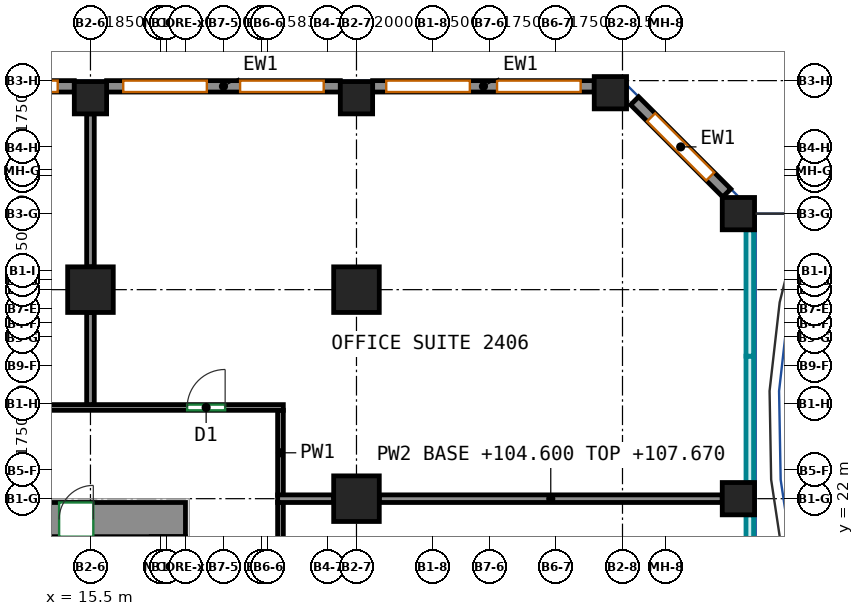
"""IFC4 building model, lengths in metres.
Left out: names, types, materials, properties, quantities, classifications, styles, units other than length and angle.
Written with IfcOpenShell. Run it as: python <this file> out.ifc"""

import sys

from ifc_helpers import new_model, si_unit, direction, frame, frame_2d, origin, origin_2d, place, context, subcontext, project, spatial, rectangle, extrude, source, transform, mapped, element, fill, save


model = new_model("IFC4")
c1 = context("Model", 3, precision=1e-05, world=origin(), true_north=direction((0.0, 1.0)))
c2 = subcontext(c1, "Body", "Model", "MODEL_VIEW")
j1 = project(units=[si_unit("LENGTHUNIT", "METRE"), si_unit("PLANEANGLEUNIT", "RADIAN")], contexts=[c1])
p1 = place(None, origin())
s1 = spatial("IfcSite", under=j1, at=p1, CompositionType="ELEMENT")
p2 = place(p1, origin())
s2 = spatial("IfcBuilding", under=s1, at=p2, CompositionType="ELEMENT")
p3 = place(p2, frame((0.0, 0.0, 104.6)))
s3 = spatial("IfcBuildingStorey", under=s2, at=p3, CompositionType="ELEMENT", Elevation=104.6)
m1 = source(origin(), c2, "Body", "SweptSolid", [
    extrude(rectangle(XDim=1.2, YDim=1.2, at=origin_2d()), origin(), (0.0, 0.0, 1.0), 3.72),
])
p4 = place(p3, frame((15.5, 27.5, 0.0), z_axis=(0.0, 0.0, 1.0), x_axis=(1.0, 0.0, 0.0)))
e1 = element("IfcColumn", 1, at=p4, inside=s3, PredefinedType="COLUMN", context=c2, shape_type="MappedRepresentation", body=[
    mapped(m1, transform((0.0, 0.0, 0.0))),
])
m2 = source(origin(), c2, "Body", "SweptSolid", [
    extrude(rectangle(XDim=0.85, YDim=0.85, at=origin_2d()), origin(), (0.0, 0.0, 1.0), 3.72),
])
p5 = place(p3, frame((15.5, 32.55, 0.0), z_axis=(0.0, 0.0, 1.0), x_axis=(1.0, 0.0, 0.0)))
e2 = element("IfcColumn", 2, at=p5, inside=s3, PredefinedType="COLUMN", context=c2, shape_type="MappedRepresentation", body=[
    mapped(m2, transform((0.0, 0.0, 0.0))),
])
for number, where, z_axis, x_axis in (
    (3, (22.5, 22.0, 0.0), (0.0, 0.0, 1.0), (1.0, 0.0, 0.0)),
    (4, (22.5, 27.5, 0.0), (0.0, 0.0, 1.0), (1.0, 0.0, 0.0)),
):
    element("IfcColumn", number, at=place(p3, frame(where, z_axis=z_axis, x_axis=x_axis)), inside=s3, PredefinedType="COLUMN", context=c2, shape_type="MappedRepresentation", body=[
        mapped(m1, transform((0.0, 0.0, 0.0))),
    ])
for number, where, z_axis, x_axis in (
    (5, (22.5, 32.55, 0.0), (0.0, 0.0, 1.0), (1.0, 0.0, 0.0)),
    (6, (29.182, 32.682, 0.0), (0.0, 0.0, 1.0), (1.0, 0.0, 0.0)),
    (7, (32.55, 22.0, 0.0), (0.0, 0.0, 1.0), (1.0, 0.0, 0.0)),
    (8, (32.55, 29.5, 0.0), (0.0, 0.0, 1.0), (1.0, 0.0, 0.0)),
):
    element("IfcColumn", number, at=place(p3, frame(where, z_axis=z_axis, x_axis=x_axis)), inside=s3, PredefinedType="COLUMN", context=c2, shape_type="MappedRepresentation", body=[
        mapped(m2, transform((0.0, 0.0, 0.0))),
    ])
m3 = source(origin(), c2, "Body", "SweptSolid", [
    extrude(rectangle(XDim=33.9, YDim=0.9, at=frame_2d((16.95, 0.0))), origin(), (0.0, 0.0, 1.0), 3.72),
])
p6 = place(p3, frame((-15.9, 21.45, 0.0), z_axis=(0.0, 0.0, 1.0), x_axis=(1.0, 0.0, 0.0)))
e9 = element("IfcWall", 9, at=p6, inside=s3, PredefinedType="SHEAR", context=c2, shape_type="MappedRepresentation", body=[
    mapped(m3, transform((0.0, 0.0, 0.0))),
])
p7 = place(p6, frame((7.12, 0.0, 0.0)))
e10 = element("IfcOpeningElement", 10, at=p7, cuts=e9, PredefinedType="OPENING", context=c2, shape_type="SweptSolid", body=[
    extrude(rectangle(XDim=0.9, YDim=2.1, at=frame_2d((0.45, 1.05))), frame((0.0, 0.46, 0.0), z_axis=(0.0, -1.0, 0.0), x_axis=(1.0, 0.0, 0.0)), (0.0, 0.0, 1.0), 0.92),
])
p8 = place(p6, frame((11.1, 0.0, 0.0)))
e11 = element("IfcOpeningElement", 11, at=p8, cuts=e9, PredefinedType="OPENING", context=c2, shape_type="SweptSolid", body=[
    extrude(rectangle(XDim=0.9, YDim=2.1, at=frame_2d((0.45, 1.05))), frame((0.0, 0.46, 0.0), z_axis=(0.0, -1.0, 0.0), x_axis=(1.0, 0.0, 0.0)), (0.0, 0.0, 1.0), 0.92),
])
p9 = place(p6, frame((14.45, 0.0, 0.0)))
e12 = element("IfcOpeningElement", 12, at=p9, cuts=e9, PredefinedType="OPENING", context=c2, shape_type="SweptSolid", body=[
    extrude(rectangle(XDim=0.9, YDim=2.1, at=frame_2d((0.45, 1.05))), frame((0.0, 0.46, 0.0), z_axis=(0.0, -1.0, 0.0), x_axis=(1.0, 0.0, 0.0)), (0.0, 0.0, 1.0), 0.92),
])
p10 = place(p6, frame((19.274, 0.0, 0.0)))
e13 = element("IfcOpeningElement", 13, at=p10, cuts=e9, PredefinedType="OPENING", context=c2, shape_type="SweptSolid", body=[
    extrude(rectangle(XDim=0.9, YDim=2.1, at=frame_2d((0.45, 1.05))), frame((0.0, 0.46, 0.0), z_axis=(0.0, -1.0, 0.0), x_axis=(1.0, 0.0, 0.0)), (0.0, 0.0, 1.0), 0.92),
])
p11 = place(p6, frame((25.304, 0.0, 0.0)))
e14 = element("IfcOpeningElement", 14, at=p11, cuts=e9, PredefinedType="OPENING", context=c2, shape_type="SweptSolid", body=[
    extrude(rectangle(XDim=0.9, YDim=2.1, at=frame_2d((0.45, 1.05))), frame((0.0, 0.46, 0.0), z_axis=(0.0, -1.0, 0.0), x_axis=(1.0, 0.0, 0.0)), (0.0, 0.0, 1.0), 0.92),
])
p12 = place(p6, frame((2.425, 0.0, 0.0)))
e15 = element("IfcOpeningElement", 15, at=p12, cuts=e9, PredefinedType="OPENING", context=c2, shape_type="SweptSolid", body=[
    extrude(rectangle(XDim=0.9, YDim=2.1, at=frame_2d((0.45, 1.05))), frame((0.0, 0.46, 0.0), z_axis=(0.0, -1.0, 0.0), x_axis=(1.0, 0.0, 0.0)), (0.0, 0.0, 1.0), 0.92),
])
p13 = place(p6, frame((30.575, 0.0, 0.0)))
e16 = element("IfcOpeningElement", 16, at=p13, cuts=e9, PredefinedType="OPENING", context=c2, shape_type="SweptSolid", body=[
    extrude(rectangle(XDim=0.9, YDim=2.1, at=frame_2d((0.45, 1.05))), frame((0.0, 0.46, 0.0), z_axis=(0.0, -1.0, 0.0), x_axis=(1.0, 0.0, 0.0)), (0.0, 0.0, 1.0), 0.92),
])
m4 = source(origin(), c2, "Body", "SweptSolid", [
    extrude(rectangle(XDim=3.429, YDim=0.3, at=frame_2d((1.715, 0.0))), origin(), (0.0, 0.0, 1.0), 3.72),
])
p14 = place(p3, frame((32.244, 30.044, 0.0), z_axis=(0.0, 0.0, 1.0), x_axis=(-0.707106781187, 0.707106781187, 0.0)))
e17 = element("IfcWall", 17, at=p14, inside=s3, PredefinedType="SOLIDWALL", context=c2, shape_type="MappedRepresentation", body=[
    mapped(m4, transform((0.0, 0.0, 0.0))),
])
p15 = place(p14, frame((0.615, 0.0, 0.7)))
e18 = element("IfcOpeningElement", 18, at=p15, cuts=e17, PredefinedType="OPENING", context=c2, shape_type="SweptSolid", body=[
    extrude(rectangle(XDim=2.2, YDim=2.25, at=frame_2d((1.1, 1.125))), frame((0.0, 0.16, 0.0), z_axis=(0.0, -1.0, 0.0), x_axis=(1.0, 0.0, 0.0)), (0.0, 0.0, 1.0), 0.32),
])
m5 = source(origin(), c2, "Body", "SweptSolid", [
    extrude(rectangle(XDim=5.832, YDim=0.3, at=frame_2d((2.916, 0.0))), origin(), (0.0, 0.0, 1.0), 3.72),
])
p16 = place(p3, frame((28.757, 32.85, 0.0), z_axis=(0.0, 0.0, 1.0), x_axis=(-1.0, 0.0, 0.0)))
e19 = element("IfcWall", 19, at=p16, inside=s3, PredefinedType="SOLIDWALL", context=c2, shape_type="MappedRepresentation", body=[
    mapped(m5, transform((0.0, 0.0, 0.0))),
])
p17 = place(p16, frame((0.358, 0.0, 0.7)))
e20 = element("IfcOpeningElement", 20, at=p17, cuts=e19, PredefinedType="OPENING", context=c2, shape_type="SweptSolid", body=[
    extrude(rectangle(XDim=2.2, YDim=2.25, at=frame_2d((1.1, 1.125))), frame((0.0, 0.16, 0.0), z_axis=(0.0, -1.0, 0.0), x_axis=(1.0, 0.0, 0.0)), (0.0, 0.0, 1.0), 0.32),
])
p18 = place(p16, frame((3.274, 0.0, 0.7)))
e21 = element("IfcOpeningElement", 21, at=p18, cuts=e19, PredefinedType="OPENING", context=c2, shape_type="SweptSolid", body=[
    extrude(rectangle(XDim=2.2, YDim=2.25, at=frame_2d((1.1, 1.125))), frame((0.0, 0.16, 0.0), z_axis=(0.0, -1.0, 0.0), x_axis=(1.0, 0.0, 0.0)), (0.0, 0.0, 1.0), 0.32),
])
m6 = source(origin(), c2, "Body", "SweptSolid", [
    extrude(rectangle(XDim=6.15, YDim=0.3, at=frame_2d((3.075, 0.0))), origin(), (0.0, 0.0, 1.0), 3.72),
])
p19 = place(p3, frame((22.075, 32.85, 0.0), z_axis=(0.0, 0.0, 1.0), x_axis=(-1.0, 0.0, 0.0)))
e22 = element("IfcWall", 22, at=p19, inside=s3, PredefinedType="SOLIDWALL", context=c2, shape_type="MappedRepresentation", body=[
    mapped(m6, transform((0.0, 0.0, 0.0))),
])
p20 = place(p19, frame((0.438, 0.0, 0.7)))
e23 = element("IfcOpeningElement", 23, at=p20, cuts=e22, PredefinedType="OPENING", context=c2, shape_type="SweptSolid", body=[
    extrude(rectangle(XDim=2.2, YDim=2.25, at=frame_2d((1.1, 1.125))), frame((0.0, 0.16, 0.0), z_axis=(0.0, -1.0, 0.0), x_axis=(1.0, 0.0, 0.0)), (0.0, 0.0, 1.0), 0.32),
])
p21 = place(p19, frame((3.512, 0.0, 0.7)))
e24 = element("IfcOpeningElement", 24, at=p21, cuts=e22, PredefinedType="OPENING", context=c2, shape_type="SweptSolid", body=[
    extrude(rectangle(XDim=2.2, YDim=2.25, at=frame_2d((1.1, 1.125))), frame((0.0, 0.16, 0.0), z_axis=(0.0, -1.0, 0.0), x_axis=(1.0, 0.0, 0.0)), (0.0, 0.0, 1.0), 0.32),
])
p22 = place(p3, frame((15.075, 32.85, 0.0), z_axis=(0.0, 0.0, 1.0), x_axis=(-1.0, 0.0, 0.0)))
e25 = element("IfcWall", 25, at=p22, inside=s3, PredefinedType="SOLIDWALL", context=c2, shape_type="MappedRepresentation", body=[
    mapped(m6, transform((0.0, 0.0, 0.0))),
])
p23 = place(p22, frame((0.438, 0.0, 0.7)))
e26 = element("IfcOpeningElement", 26, at=p23, cuts=e25, PredefinedType="OPENING", context=c2, shape_type="SweptSolid", body=[
    extrude(rectangle(XDim=2.2, YDim=2.25, at=frame_2d((1.1, 1.125))), frame((0.0, 0.16, 0.0), z_axis=(0.0, -1.0, 0.0), x_axis=(1.0, 0.0, 0.0)), (0.0, 0.0, 1.0), 0.32),
])
p24 = place(p22, frame((3.512, 0.0, 0.7)))
e27 = element("IfcOpeningElement", 27, at=p24, cuts=e25, PredefinedType="OPENING", context=c2, shape_type="SweptSolid", body=[
    extrude(rectangle(XDim=2.2, YDim=2.25, at=frame_2d((1.1, 1.125))), frame((0.0, 0.16, 0.0), z_axis=(0.0, -1.0, 0.0), x_axis=(1.0, 0.0, 0.0)), (0.0, 0.0, 1.0), 0.32),
])
p25 = place(p3, frame((20.5, 17.75, 0.0), z_axis=(0.0, 0.0, 1.0), x_axis=(0.0, 1.0, 0.0)))
e28 = element("IfcWall", 28, at=p25, inside=s3, PredefinedType="PARTITIONING", context=c2, shape_type="SweptSolid", body=[
    extrude(rectangle(XDim=4.16, YDim=0.15, at=frame_2d((2.08, 0.0))), origin(), (0.0, 0.0, 1.0), 3.72),
])
p26 = place(p25, frame((1.324, 0.0, 0.0)))
e29 = element("IfcOpeningElement", 29, at=p26, cuts=e28, PredefinedType="OPENING", context=c2, shape_type="SweptSolid", body=[
    extrude(rectangle(XDim=0.9, YDim=2.1, at=frame_2d((0.45, 1.05))), frame((0.0, 0.085, 0.0), z_axis=(0.0, -1.0, 0.0), x_axis=(1.0, 0.0, 0.0)), (0.0, 0.0, 1.0), 0.17),
])
p27 = place(p3, frame((20.5, 22.09, 0.0), z_axis=(0.0, 0.0, 1.0), x_axis=(0.0, 1.0, 0.0)))
e30 = element("IfcWall", 30, at=p27, inside=s3, PredefinedType="PARTITIONING", context=c2, shape_type="SweptSolid", body=[
    extrude(rectangle(XDim=2.235, YDim=0.15, at=frame_2d((1.117, 0.0))), origin(), (0.0, 0.0, 1.0), 3.72),
])
p28 = place(p3, frame((-19.575, 24.4, 0.0), z_axis=(0.0, 0.0, 1.0), x_axis=(1.0, 0.0, 0.0)))
e31 = element("IfcWall", 31, at=p28, inside=s3, PredefinedType="PARTITIONING", context=c2, shape_type="SweptSolid", body=[
    extrude(rectangle(XDim=40.15, YDim=0.15, at=frame_2d((20.075, 0.0))), origin(), (0.0, 0.0, 1.0), 3.72),
])
p29 = place(p28, frame((9.974, 0.0, 0.0)))
e32 = element("IfcOpeningElement", 32, at=p29, cuts=e31, PredefinedType="OPENING", context=c2, shape_type="SweptSolid", body=[
    extrude(rectangle(XDim=0.9, YDim=2.1, at=frame_2d((0.45, 1.05))), frame((0.0, 0.085, 0.0), z_axis=(0.0, -1.0, 0.0), x_axis=(1.0, 0.0, 0.0)), (0.0, 0.0, 1.0), 0.17),
])
p30 = place(p28, frame((15.57, 0.0, 0.0)))
e33 = element("IfcOpeningElement", 33, at=p30, cuts=e31, PredefinedType="OPENING", context=c2, shape_type="SweptSolid", body=[
    extrude(rectangle(XDim=0.9, YDim=2.1, at=frame_2d((0.45, 1.05))), frame((0.0, 0.085, 0.0), z_axis=(0.0, -1.0, 0.0), x_axis=(1.0, 0.0, 0.0)), (0.0, 0.0, 1.0), 0.17),
])
p31 = place(p28, frame((26.373, 0.0, 0.0)))
e34 = element("IfcOpeningElement", 34, at=p31, cuts=e31, PredefinedType="OPENING", context=c2, shape_type="SweptSolid", body=[
    extrude(rectangle(XDim=1.0, YDim=2.1, at=frame_2d((0.5, 1.05))), frame((0.0, 0.085, 0.0), z_axis=(0.0, -1.0, 0.0), x_axis=(1.0, 0.0, 0.0)), (0.0, 0.0, 1.0), 0.17),
])
p32 = place(p28, frame((37.619, 0.0, 0.0)))
e35 = element("IfcOpeningElement", 35, at=p32, cuts=e31, PredefinedType="OPENING", context=c2, shape_type="SweptSolid", body=[
    extrude(rectangle(XDim=1.0, YDim=2.1, at=frame_2d((0.5, 1.05))), frame((0.0, 0.085, 0.0), z_axis=(0.0, -1.0, 0.0), x_axis=(1.0, 0.0, 0.0)), (0.0, 0.0, 1.0), 0.17),
])
p33 = place(p3, frame((23.1, 22.0, 0.0), z_axis=(0.0, 0.0, 1.0), x_axis=(1.0, 0.0, 0.0)))
e36 = element("IfcWall", 36, at=p33, inside=s3, PredefinedType="PARTITIONING", context=c2, shape_type="SweptSolid", body=[
    extrude(rectangle(XDim=9.025, YDim=0.2, at=frame_2d((4.512, 0.0))), origin(), (0.0, 0.0, 1.0), 3.07),
])
p34 = place(p3, frame((20.426, 22.0, 0.0), z_axis=(0.0, 0.0, 1.0), x_axis=(1.0, 0.0, 0.0)))
e37 = element("IfcWall", 37, at=p34, inside=s3, PredefinedType="PARTITIONING", context=c2, shape_type="SweptSolid", body=[
    extrude(rectangle(XDim=1.474, YDim=0.2, at=frame_2d((0.737, 0.0))), origin(), (0.0, 0.0, 1.0), 3.72),
])
p35 = place(p3, frame((15.5, 28.1, 0.0), z_axis=(0.0, 0.0, 1.0), x_axis=(0.0, 1.0, 0.0)))
e38 = element("IfcWall", 38, at=p35, inside=s3, PredefinedType="PARTITIONING", context=c2, shape_type="SweptSolid", body=[
    extrude(rectangle(XDim=4.025, YDim=0.2, at=frame_2d((2.012, 0.0))), origin(), (0.0, 0.0, 1.0), 3.72),
])
p36 = place(p3, frame((15.5, 24.476, 0.0), z_axis=(0.0, 0.0, 1.0), x_axis=(0.0, 1.0, 0.0)))
e39 = element("IfcWall", 39, at=p36, inside=s3, PredefinedType="PARTITIONING", context=c2, shape_type="SweptSolid", body=[
    extrude(rectangle(XDim=2.424, YDim=0.2, at=frame_2d((1.212, 0.0))), origin(), (0.0, 0.0, 1.0), 3.72),
])
p37 = place(p15, origin())
e40 = element("IfcWindow", 40, at=p37, inside=s3, PartitioningType="SINGLE_PANEL", PredefinedType="WINDOW", context=c2, shape_type="SweptSolid", body=[
    extrude(rectangle(XDim=2.2, YDim=2.25, at=frame_2d((1.1, 1.125))), frame((0.0, 0.03, 0.0), z_axis=(0.0, -1.0, 0.0), x_axis=(1.0, 0.0, 0.0)), (0.0, 0.0, 1.0), 0.06),
])
fill(e18, e40)
p38 = place(p17, origin())
e41 = element("IfcWindow", 41, at=p38, inside=s3, PartitioningType="SINGLE_PANEL", PredefinedType="WINDOW", context=c2, shape_type="SweptSolid", body=[
    extrude(rectangle(XDim=2.2, YDim=2.25, at=frame_2d((1.1, 1.125))), frame((0.0, 0.03, 0.0), z_axis=(0.0, -1.0, 0.0), x_axis=(1.0, 0.0, 0.0)), (0.0, 0.0, 1.0), 0.06),
])
fill(e20, e41)
p39 = place(p18, origin())
e42 = element("IfcWindow", 42, at=p39, inside=s3, PartitioningType="SINGLE_PANEL", PredefinedType="WINDOW", context=c2, shape_type="SweptSolid", body=[
    extrude(rectangle(XDim=2.2, YDim=2.25, at=frame_2d((1.1, 1.125))), frame((0.0, 0.03, 0.0), z_axis=(0.0, -1.0, 0.0), x_axis=(1.0, 0.0, 0.0)), (0.0, 0.0, 1.0), 0.06),
])
fill(e21, e42)
p40 = place(p20, origin())
e43 = element("IfcWindow", 43, at=p40, inside=s3, PartitioningType="SINGLE_PANEL", PredefinedType="WINDOW", context=c2, shape_type="SweptSolid", body=[
    extrude(rectangle(XDim=2.2, YDim=2.25, at=frame_2d((1.1, 1.125))), frame((0.0, 0.03, 0.0), z_axis=(0.0, -1.0, 0.0), x_axis=(1.0, 0.0, 0.0)), (0.0, 0.0, 1.0), 0.06),
])
fill(e23, e43)
p41 = place(p21, origin())
e44 = element("IfcWindow", 44, at=p41, inside=s3, PartitioningType="SINGLE_PANEL", PredefinedType="WINDOW", context=c2, shape_type="SweptSolid", body=[
    extrude(rectangle(XDim=2.2, YDim=2.25, at=frame_2d((1.1, 1.125))), frame((0.0, 0.03, 0.0), z_axis=(0.0, -1.0, 0.0), x_axis=(1.0, 0.0, 0.0)), (0.0, 0.0, 1.0), 0.06),
])
fill(e24, e44)
p42 = place(p23, origin())
e45 = element("IfcWindow", 45, at=p42, inside=s3, PartitioningType="SINGLE_PANEL", PredefinedType="WINDOW", context=c2, shape_type="SweptSolid", body=[
    extrude(rectangle(XDim=2.2, YDim=2.25, at=frame_2d((1.1, 1.125))), frame((0.0, 0.03, 0.0), z_axis=(0.0, -1.0, 0.0), x_axis=(1.0, 0.0, 0.0)), (0.0, 0.0, 1.0), 0.06),
])
fill(e26, e45)
p43 = place(p13, origin())
e46 = element("IfcDoor", 46, at=p43, inside=s3, OperationType="SINGLE_SWING_RIGHT", PredefinedType="DOOR", context=c2, shape_type="SweptSolid", body=[
    extrude(rectangle(XDim=0.9, YDim=2.1, at=frame_2d((0.45, 1.05))), frame((0.0, -0.305, 0.0), z_axis=(0.0, -1.0, 0.0), x_axis=(1.0, 0.0, 0.0)), (0.0, 0.0, 1.0), 0.05),
])
fill(e16, e46)
p44 = place(p32, origin())
e47 = element("IfcDoor", 47, at=p44, inside=s3, OperationType="SINGLE_SWING_RIGHT", PredefinedType="DOOR", context=c2, shape_type="SweptSolid", body=[
    extrude(rectangle(XDim=1.0, YDim=2.1, at=frame_2d((0.5, 1.05))), frame((0.0, 0.025, 0.0), z_axis=(0.0, -1.0, 0.0), x_axis=(1.0, 0.0, 0.0)), (0.0, 0.0, 1.0), 0.05),
])
fill(e35, e47)
save(model, sys.argv[1])
